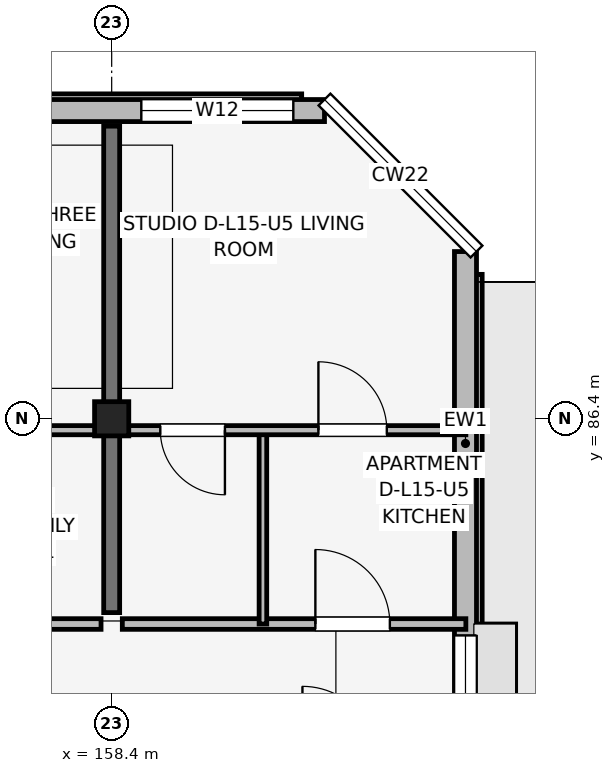
"""IFC4 building model, lengths in metres.
Left out: names, types, materials, properties, quantities, classifications, styles, units other than length and angle.
Written with IfcOpenShell. Run it as: python <this file> out.ifc"""

import sys

from ifc_helpers import new_model, si_unit, direction, frame, frame_2d, origin, origin_2d, place, context, subcontext, project, spatial, rectangle, extrude, element, fill, save


model = new_model("IFC4")
c1 = context("Model", 3, precision=1e-05, world=origin(), true_north=direction((0.0, 1.0)))
c2 = subcontext(c1, "Body", "Model", "MODEL_VIEW")
j1 = project(units=[si_unit("LENGTHUNIT", "METRE"), si_unit("PLANEANGLEUNIT", "RADIAN")], contexts=[c1])
p1 = place(None, origin())
s1 = spatial("IfcSite", under=j1, at=p1, CompositionType="ELEMENT")
p2 = place(p1, origin())
s2 = spatial("IfcBuilding", under=s1, at=p2, CompositionType="ELEMENT")
p3 = place(p2, frame((0.0, 0.0, 49.65)))
s3 = spatial("IfcBuildingStorey", under=s2, at=p3, CompositionType="ELEMENT", Elevation=49.65)
p4 = place(p3, frame((158.4, 86.4, 0.0), z_axis=(0.0, 0.0, 1.0), x_axis=(1.0, 0.0, 0.0)))
e1 = element("IfcColumn", 1, at=p4, inside=s3, PredefinedType="COLUMN", context=c2, shape_type="SweptSolid", body=[
    extrude(rectangle(XDim=0.45, YDim=0.45, at=origin_2d()), origin(), (0.0, 0.0, 1.0), 3.15),
])
p5 = place(p3, frame((158.4, 83.85, 0.0), z_axis=(0.0, 0.0, 1.0), x_axis=(0.0, 1.0, 0.0)))
e2 = element("IfcWall", 2, at=p5, inside=s3, PredefinedType="SHEAR", context=c2, shape_type="SweptSolid", body=[
    extrude(rectangle(XDim=6.4, YDim=0.21, at=frame_2d((3.2, 0.0))), origin(), (0.0, 0.0, 1.0), 3.15),
])
p6 = place(p3, frame((163.055, 74.0, 0.0), z_axis=(0.0, 0.0, 1.0), x_axis=(0.0, 1.0, 0.0)))
e3 = element("IfcWall", 3, at=p6, inside=s3, PredefinedType="SOLIDWALL", context=c2, shape_type="SweptSolid", body=[
    extrude(rectangle(XDim=14.6, YDim=0.29, at=frame_2d((7.3, 0.0))), origin(), (0.0, 0.0, 1.0), 2.91),
])
p7 = place(p6, frame((6.65, 0.0, 0.0), z_axis=(0.0, 0.0, 1.0), x_axis=(-1.0, 0.0, 0.0)))
e4 = element("IfcOpeningElement", 4, at=p7, cuts=e3, PredefinedType="OPENING", context=c2, shape_type="SweptSolid", body=[
    extrude(rectangle(XDim=1.9, YDim=2.2, at=frame_2d((0.95, 1.1))), frame((0.0, 0.155, 0.0), z_axis=(0.0, -1.0, 0.0), x_axis=(1.0, 0.0, 0.0)), (0.0, 0.0, 1.0), 0.31),
])
p8 = place(p6, frame((8.05, 0.0, 1.05)))
e5 = element("IfcOpeningElement", 5, at=p8, cuts=e3, PredefinedType="OPENING", context=c2, shape_type="SweptSolid", body=[
    extrude(rectangle(XDim=1.5, YDim=1.15, at=frame_2d((0.75, 0.575))), frame((0.0, 0.155, 0.0), z_axis=(0.0, -1.0, 0.0), x_axis=(1.0, 0.0, 0.0)), (0.0, 0.0, 1.0), 0.31),
])
p9 = place(p3, frame((161.2, 90.455, 0.0), z_axis=(0.0, 0.0, 1.0), x_axis=(-1.0, 0.0, 0.0)))
e6 = element("IfcWall", 6, at=p9, inside=s3, PredefinedType="SOLIDWALL", context=c2, shape_type="SweptSolid", body=[
    extrude(rectangle(XDim=26.6, YDim=0.29, at=frame_2d((13.3, 0.0))), origin(), (0.0, 0.0, 1.0), 2.48),
])
p10 = place(p9, frame((22.91, 0.0, 0.75)))
e7 = element("IfcOpeningElement", 7, at=p10, cuts=e6, PredefinedType="OPENING", context=c2, shape_type="SweptSolid", body=[
    extrude(rectangle(XDim=0.85, YDim=1.4, at=frame_2d((0.425, 0.7))), frame((0.0, 0.155, 0.0), z_axis=(0.0, -1.0, 0.0), x_axis=(1.0, 0.0, 0.0)), (0.0, 0.0, 1.0), 0.31),
])
p11 = place(p9, frame((18.725, 0.0, 0.7)))
e8 = element("IfcOpeningElement", 8, at=p11, cuts=e6, PredefinedType="OPENING", context=c2, shape_type="SweptSolid", body=[
    extrude(rectangle(XDim=2.3, YDim=1.65, at=frame_2d((1.15, 0.825))), frame((0.0, 0.155, 0.0), z_axis=(0.0, -1.0, 0.0), x_axis=(1.0, 0.0, 0.0)), (0.0, 0.0, 1.0), 0.31),
])
p12 = place(p9, frame((13.935, 0.0, 0.7)))
e9 = element("IfcOpeningElement", 9, at=p12, cuts=e6, PredefinedType="OPENING", context=c2, shape_type="SweptSolid", body=[
    extrude(rectangle(XDim=2.45, YDim=1.65, at=frame_2d((1.225, 0.825))), frame((0.0, 0.155, 0.0), z_axis=(0.0, -1.0, 0.0), x_axis=(1.0, 0.0, 0.0)), (0.0, 0.0, 1.0), 0.31),
])
p13 = place(p9, frame((11.09, 0.0, 0.75)))
e10 = element("IfcOpeningElement", 10, at=p13, cuts=e6, PredefinedType="OPENING", context=c2, shape_type="SweptSolid", body=[
    extrude(rectangle(XDim=1.22, YDim=1.5, at=frame_2d((0.61, 0.75))), frame((0.0, 0.155, 0.0), z_axis=(0.0, -1.0, 0.0), x_axis=(1.0, 0.0, 0.0)), (0.0, 0.0, 1.0), 0.31),
])
p14 = place(p9, frame((8.265, 0.0, 0.75)))
e11 = element("IfcOpeningElement", 11, at=p14, cuts=e6, PredefinedType="OPENING", context=c2, shape_type="SweptSolid", body=[
    extrude(rectangle(XDim=1.34, YDim=1.55, at=frame_2d((0.67, 0.775))), frame((0.0, 0.155, 0.0), z_axis=(0.0, -1.0, 0.0), x_axis=(1.0, 0.0, 0.0)), (0.0, 0.0, 1.0), 0.31),
])
p15 = place(p9, frame((4.545, 0.0, 0.7)))
e12 = element("IfcOpeningElement", 12, at=p15, cuts=e6, PredefinedType="OPENING", context=c2, shape_type="SweptSolid", body=[
    extrude(rectangle(XDim=1.86, YDim=1.6, at=frame_2d((0.93, 0.8))), frame((0.0, 0.155, 0.0), z_axis=(0.0, -1.0, 0.0), x_axis=(1.0, 0.0, 0.0)), (0.0, 0.0, 1.0), 0.31),
])
p16 = place(p9, frame((0.41, 0.0, 0.7)))
e13 = element("IfcOpeningElement", 13, at=p16, cuts=e6, PredefinedType="OPENING", context=c2, shape_type="SweptSolid", body=[
    extrude(rectangle(XDim=2.0, YDim=1.65, at=frame_2d((1.0, 0.825))), frame((0.0, 0.155, 0.0), z_axis=(0.0, -1.0, 0.0), x_axis=(1.0, 0.0, 0.0)), (0.0, 0.0, 1.0), 0.31),
])
p17 = place(p3, frame((151.34, 83.7, 0.0), z_axis=(0.0, 0.0, 1.0), x_axis=(1.0, 0.0, 0.0)))
e14 = element("IfcWall", 14, at=p17, inside=s3, PredefinedType="PARTITIONING", context=c2, shape_type="SweptSolid", body=[
    extrude(rectangle(XDim=6.92, YDim=0.14, at=frame_2d((3.46, 0.0))), origin(), (0.0, 0.0, 1.0), 2.38),
])
p18 = place(p17, frame((6.0, 0.0, 0.0), z_axis=(0.0, 0.0, 1.0), x_axis=(-1.0, 0.0, 0.0)))
e15 = element("IfcOpeningElement", 15, at=p18, cuts=e14, PredefinedType="OPENING", context=c2, shape_type="SweptSolid", body=[
    extrude(rectangle(XDim=0.98, YDim=2.1, at=frame_2d((0.49, 1.05))), frame((0.0, 0.08, 0.0), z_axis=(0.0, -1.0, 0.0), x_axis=(1.0, 0.0, 0.0)), (0.0, 0.0, 1.0), 0.16),
])
p19 = place(p3, frame((151.34, 86.25, 0.0), z_axis=(0.0, 0.0, 1.0), x_axis=(1.0, 0.0, 0.0)))
e16 = element("IfcWall", 16, at=p19, inside=s3, PredefinedType="PARTITIONING", context=c2, shape_type="SweptSolid", body=[
    extrude(rectangle(XDim=6.92, YDim=0.12, at=frame_2d((3.46, 0.0))), origin(), (0.0, 0.0, 1.0), 2.38),
])
p20 = place(p19, frame((0.5, 0.0, 0.0)))
e17 = element("IfcOpeningElement", 17, at=p20, cuts=e16, PredefinedType="OPENING", context=c2, shape_type="SweptSolid", body=[
    extrude(rectangle(XDim=0.85, YDim=2.08, at=frame_2d((0.425, 1.04))), frame((0.0, 0.07, 0.0), z_axis=(0.0, -1.0, 0.0), x_axis=(1.0, 0.0, 0.0)), (0.0, 0.0, 1.0), 0.14),
])
p21 = place(p19, frame((3.425, 0.0, 0.0), z_axis=(0.0, 0.0, 1.0), x_axis=(-1.0, 0.0, 0.0)))
e18 = element("IfcOpeningElement", 18, at=p21, cuts=e16, PredefinedType="OPENING", context=c2, shape_type="SweptSolid", body=[
    extrude(rectangle(XDim=0.9, YDim=2.08, at=frame_2d((0.45, 1.04))), frame((0.0, 0.07, 0.0), z_axis=(0.0, -1.0, 0.0), x_axis=(1.0, 0.0, 0.0)), (0.0, 0.0, 1.0), 0.14),
])
p22 = place(p19, frame((5.035, 0.0, 0.0)))
e19 = element("IfcOpeningElement", 19, at=p22, cuts=e16, PredefinedType="OPENING", context=c2, shape_type="SweptSolid", body=[
    extrude(rectangle(XDim=0.95, YDim=2.08, at=frame_2d((0.475, 1.04))), frame((0.0, 0.07, 0.0), z_axis=(0.0, -1.0, 0.0), x_axis=(1.0, 0.0, 0.0)), (0.0, 0.0, 1.0), 0.14),
])
p23 = place(p3, frame((158.54, 83.7, 0.0), z_axis=(0.0, 0.0, 1.0), x_axis=(1.0, 0.0, 0.0)))
e20 = element("IfcWall", 20, at=p23, inside=s3, PredefinedType="PARTITIONING", context=c2, shape_type="SweptSolid", body=[
    extrude(rectangle(XDim=4.52, YDim=0.14, at=frame_2d((2.26, 0.0))), origin(), (0.0, 0.0, 1.0), 2.38),
])
p24 = place(p23, frame((2.54, 0.0, 0.0)))
e21 = element("IfcOpeningElement", 21, at=p24, cuts=e20, PredefinedType="OPENING", context=c2, shape_type="SweptSolid", body=[
    extrude(rectangle(XDim=0.98, YDim=2.1, at=frame_2d((0.49, 1.05))), frame((0.0, 0.08, 0.0), z_axis=(0.0, -1.0, 0.0), x_axis=(1.0, 0.0, 0.0)), (0.0, 0.0, 1.0), 0.16),
])
p25 = place(p3, frame((160.39, 83.7, 0.0), z_axis=(0.0, 0.0, 1.0), x_axis=(0.0, 1.0, 0.0)))
e22 = element("IfcWall", 22, at=p25, inside=s3, PredefinedType="PARTITIONING", context=c2, shape_type="SweptSolid", body=[
    extrude(rectangle(XDim=2.55, YDim=0.1, at=frame_2d((1.275, 0.0))), origin(), (0.0, 0.0, 1.0), 2.38),
])
p26 = place(p3, frame((158.54, 86.25, 0.0), z_axis=(0.0, 0.0, 1.0), x_axis=(1.0, 0.0, 0.0)))
e23 = element("IfcWall", 23, at=p26, inside=s3, PredefinedType="PARTITIONING", context=c2, shape_type="SweptSolid", body=[
    extrude(rectangle(XDim=4.52, YDim=0.12, at=frame_2d((2.26, 0.0))), origin(), (0.0, 0.0, 1.0), 2.38),
])
p27 = place(p26, frame((1.35, 0.0, 0.0), z_axis=(0.0, 0.0, 1.0), x_axis=(-1.0, 0.0, 0.0)))
e24 = element("IfcOpeningElement", 24, at=p27, cuts=e23, PredefinedType="OPENING", context=c2, shape_type="SweptSolid", body=[
    extrude(rectangle(XDim=0.85, YDim=2.08, at=frame_2d((0.425, 1.04))), frame((0.0, 0.07, 0.0), z_axis=(0.0, -1.0, 0.0), x_axis=(1.0, 0.0, 0.0)), (0.0, 0.0, 1.0), 0.14),
])
p28 = place(p26, frame((2.58, 0.0, 0.0)))
e25 = element("IfcOpeningElement", 25, at=p28, cuts=e23, PredefinedType="OPENING", context=c2, shape_type="SweptSolid", body=[
    extrude(rectangle(XDim=0.9, YDim=2.08, at=frame_2d((0.45, 1.04))), frame((0.0, 0.07, 0.0), z_axis=(0.0, -1.0, 0.0), x_axis=(1.0, 0.0, 0.0)), (0.0, 0.0, 1.0), 0.14),
])
p29 = place(p16, origin())
e26 = element("IfcWindow", 26, at=p29, inside=s3, PartitioningType="SINGLE_PANEL", PredefinedType="WINDOW", context=c2, shape_type="SweptSolid", body=[
    extrude(rectangle(XDim=2.0, YDim=1.65, at=frame_2d((1.0, 0.825))), frame((0.0, 0.03, 0.0), z_axis=(0.0, -1.0, 0.0), x_axis=(1.0, 0.0, 0.0)), (0.0, 0.0, 1.0), 0.06),
])
fill(e13, e26)
p30 = place(p8, origin())
e27 = element("IfcWindow", 27, at=p30, inside=s3, PartitioningType="SINGLE_PANEL", PredefinedType="WINDOW", context=c2, shape_type="SweptSolid", body=[
    extrude(rectangle(XDim=1.5, YDim=1.15, at=frame_2d((0.75, 0.575))), frame((0.0, 0.03, 0.0), z_axis=(0.0, -1.0, 0.0), x_axis=(1.0, 0.0, 0.0)), (0.0, 0.0, 1.0), 0.06),
])
fill(e5, e27)
p31 = place(p24, origin())
e28 = element("IfcDoor", 28, at=p31, inside=s3, OperationType="SINGLE_SWING_LEFT", PredefinedType="DOOR", context=c2, shape_type="SweptSolid", body=[
    extrude(rectangle(XDim=0.98, YDim=2.1, at=frame_2d((0.49, 1.05))), frame((0.0, 0.025, 0.0), z_axis=(0.0, -1.0, 0.0), x_axis=(1.0, 0.0, 0.0)), (0.0, 0.0, 1.0), 0.05),
])
fill(e21, e28)
p32 = place(p27, origin())
e29 = element("IfcDoor", 29, at=p32, inside=s3, OperationType="SINGLE_SWING_RIGHT", PredefinedType="DOOR", context=c2, shape_type="SweptSolid", body=[
    extrude(rectangle(XDim=0.85, YDim=2.08, at=frame_2d((0.425, 1.04))), frame((0.0, 0.025, 0.0), z_axis=(0.0, -1.0, 0.0), x_axis=(1.0, 0.0, 0.0)), (0.0, 0.0, 1.0), 0.05),
])
fill(e24, e29)
p33 = place(p28, origin())
e30 = element("IfcDoor", 30, at=p33, inside=s3, OperationType="SINGLE_SWING_LEFT", PredefinedType="DOOR", context=c2, shape_type="SweptSolid", body=[
    extrude(rectangle(XDim=0.9, YDim=2.08, at=frame_2d((0.45, 1.04))), frame((0.0, 0.025, 0.0), z_axis=(0.0, -1.0, 0.0), x_axis=(1.0, 0.0, 0.0)), (0.0, 0.0, 1.0), 0.05),
])
fill(e25, e30)
save(model, sys.argv[1])
